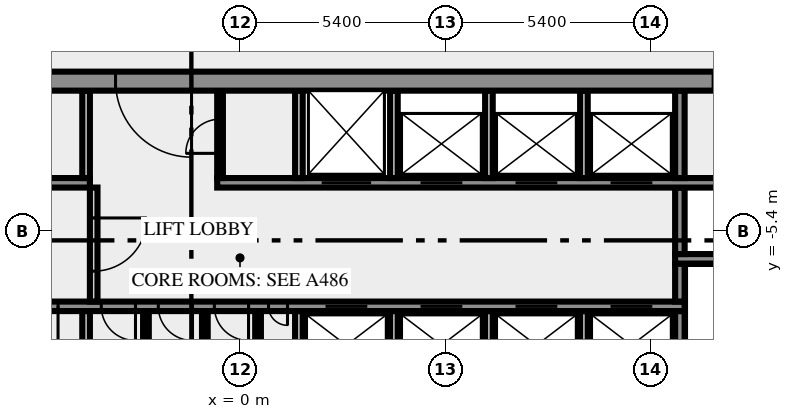
"""IFC4 building model, lengths in metres.
Left out: names, types, materials, properties, quantities, classifications, styles, units other than length and angle.
Written with IfcOpenShell. Run it as: python <this file> out.ifc"""

import sys

from ifc_helpers import new_model, si_unit, direction, frame, frame_2d, origin, place, context, subcontext, project, spatial, rectangle, extrude, element, fill, save


model = new_model("IFC4")
c1 = context("Model", 3, precision=1e-05, world=origin(), true_north=direction((0.0, 1.0)))
c2 = subcontext(c1, "Body", "Model", "MODEL_VIEW")
j1 = project(units=[si_unit("LENGTHUNIT", "METRE"), si_unit("PLANEANGLEUNIT", "RADIAN")], contexts=[c1])
p1 = place(None, origin())
s1 = spatial("IfcSite", under=j1, at=p1, CompositionType="ELEMENT")
p2 = place(p1, origin())
s2 = spatial("IfcBuilding", under=s1, at=p2, CompositionType="ELEMENT")
p3 = place(p2, frame((0.0, 0.0, 176.0)))
s3 = spatial("IfcBuildingStorey", under=s2, at=p3, CompositionType="ELEMENT", Elevation=176.0)
p4 = place(p3, frame((-4.05, -10.5, 0.0), z_axis=(0.0, 0.0, 1.0), x_axis=(0.0, 1.0, 0.0)))
e1 = element("IfcWall", 1, at=p4, inside=s3, PredefinedType="SOLIDWALL", context=c2, shape_type="SweptSolid", body=[
    extrude(rectangle(XDim=3.0, YDim=0.2, at=frame_2d((1.5, 0.0))), origin(), (0.0, 0.0, 1.0), 3.65),
])
for number, where, z_axis, x_axis in (
    (2, (-2.475, -10.5, 0.0), (0.0, 0.0, 1.0), (0.0, 1.0, 0.0)),
    (3, (-0.925, -10.5, 0.0), (0.0, 0.0, 1.0), (0.0, 1.0, 0.0)),
    (4, (0.475, -10.5, 0.0), (0.0, 0.0, 1.0), (0.0, 1.0, 0.0)),
):
    element("IfcWall", number, at=place(p3, frame(where, z_axis=z_axis, x_axis=x_axis)), inside=s3, PredefinedType="PARTITIONING", context=c2, shape_type="SweptSolid", body=[
        extrude(rectangle(XDim=3.0, YDim=0.15, at=frame_2d((1.5, 0.0))), origin(), (0.0, 0.0, 1.0), 3.65),
    ])
for number, where, z_axis, x_axis in (
    (5, (1.55, -10.5, 0.0), (0.0, 0.0, 1.0), (0.0, 1.0, 0.0)),
    (6, (4.05, -10.5, 0.0), (0.0, 0.0, 1.0), (0.0, 1.0, 0.0)),
    (7, (6.55, -10.5, 0.0), (0.0, 0.0, 1.0), (0.0, 1.0, 0.0)),
    (8, (9.05, -10.5, 0.0), (0.0, 0.0, 1.0), (0.0, 1.0, 0.0)),
):
    element("IfcWall", number, at=place(p3, frame(where, z_axis=z_axis, x_axis=x_axis)), inside=s3, PredefinedType="SOLIDWALL", context=c2, shape_type="SweptSolid", body=[
        extrude(rectangle(XDim=3.0, YDim=0.2, at=frame_2d((1.5, 0.0))), origin(), (0.0, 0.0, 1.0), 3.65),
    ])
p5 = place(p3, frame((11.575, -10.5, 0.0), z_axis=(0.0, 0.0, 1.0), x_axis=(0.0, 1.0, 0.0)))
e9 = element("IfcWall", 9, at=p5, inside=s3, PredefinedType="SHEAR", context=c2, shape_type="SweptSolid", body=[
    extrude(rectangle(XDim=3.0, YDim=0.25, at=frame_2d((1.5, 0.0))), origin(), (0.0, 0.0, 1.0), 3.65),
])
p6 = place(p3, frame((11.7, -7.375, 0.0), z_axis=(0.0, 0.0, 1.0), x_axis=(-1.0, 0.0, 0.0)))
e10 = element("IfcWall", 10, at=p6, inside=s3, PredefinedType="SHEAR", context=c2, shape_type="SweptSolid", body=[
    extrude(rectangle(XDim=23.4, YDim=0.25, at=frame_2d((11.7, 0.0))), origin(), (0.0, 0.0, 1.0), 3.65),
])
p7 = place(p6, frame((20.213, 0.0, 0.0)))
e11 = element("IfcOpeningElement", 11, at=p7, cuts=e10, PredefinedType="OPENING", context=c2, shape_type="SweptSolid", body=[
    extrude(rectangle(XDim=0.9, YDim=2.1, at=frame_2d((0.45, 1.05))), frame((0.0, 0.135, 0.0), z_axis=(0.0, -1.0, 0.0), x_axis=(1.0, 0.0, 0.0)), (0.0, 0.0, 1.0), 0.27),
])
p8 = place(p6, frame((16.488, 0.0, 0.0)))
e12 = element("IfcOpeningElement", 12, at=p8, cuts=e10, PredefinedType="OPENING", context=c2, shape_type="SweptSolid", body=[
    extrude(rectangle(XDim=0.9, YDim=2.1, at=frame_2d((0.45, 1.05))), frame((0.0, 0.135, 0.0), z_axis=(0.0, -1.0, 0.0), x_axis=(1.0, 0.0, 0.0)), (0.0, 0.0, 1.0), 0.27),
])
p9 = place(p6, frame((14.45, 0.0, 0.0)))
e13 = element("IfcOpeningElement", 13, at=p9, cuts=e10, PredefinedType="OPENING", context=c2, shape_type="SweptSolid", body=[
    extrude(rectangle(XDim=0.9, YDim=2.1, at=frame_2d((0.45, 1.05))), frame((0.0, 0.135, 0.0), z_axis=(0.0, -1.0, 0.0), x_axis=(1.0, 0.0, 0.0)), (0.0, 0.0, 1.0), 0.27),
])
p10 = place(p6, frame((12.95, 0.0, 0.0)))
e14 = element("IfcOpeningElement", 14, at=p10, cuts=e10, PredefinedType="OPENING", context=c2, shape_type="SweptSolid", body=[
    extrude(rectangle(XDim=0.9, YDim=2.1, at=frame_2d((0.45, 1.05))), frame((0.0, 0.135, 0.0), z_axis=(0.0, -1.0, 0.0), x_axis=(1.0, 0.0, 0.0)), (0.0, 0.0, 1.0), 0.27),
])
p11 = place(p6, frame((11.475, 0.0, 0.0)))
e15 = element("IfcOpeningElement", 15, at=p11, cuts=e10, PredefinedType="OPENING", context=c2, shape_type="SweptSolid", body=[
    extrude(rectangle(XDim=0.9, YDim=2.1, at=frame_2d((0.45, 1.05))), frame((0.0, 0.135, 0.0), z_axis=(0.0, -1.0, 0.0), x_axis=(1.0, 0.0, 0.0)), (0.0, 0.0, 1.0), 0.27),
])
p12 = place(p6, frame((10.45, 0.0, 0.0)))
e16 = element("IfcOpeningElement", 16, at=p12, cuts=e10, PredefinedType="OPENING", context=c2, shape_type="SweptSolid", body=[
    extrude(rectangle(XDim=0.5, YDim=2.1, at=frame_2d((0.25, 1.05))), frame((0.0, 0.135, 0.0), z_axis=(0.0, -1.0, 0.0), x_axis=(1.0, 0.0, 0.0)), (0.0, 0.0, 1.0), 0.27),
])
p13 = place(p6, frame((8.35, 0.0, 0.0)))
e17 = element("IfcOpeningElement", 17, at=p13, cuts=e10, PredefinedType="OPENING", context=c2, shape_type="SweptSolid", body=[
    extrude(rectangle(XDim=1.1, YDim=2.1, at=frame_2d((0.55, 1.05))), frame((0.0, 0.135, 0.0), z_axis=(0.0, -1.0, 0.0), x_axis=(1.0, 0.0, 0.0)), (0.0, 0.0, 1.0), 0.27),
])
p14 = place(p6, frame((5.85, 0.0, 0.0)))
e18 = element("IfcOpeningElement", 18, at=p14, cuts=e10, PredefinedType="OPENING", context=c2, shape_type="SweptSolid", body=[
    extrude(rectangle(XDim=1.1, YDim=2.1, at=frame_2d((0.55, 1.05))), frame((0.0, 0.135, 0.0), z_axis=(0.0, -1.0, 0.0), x_axis=(1.0, 0.0, 0.0)), (0.0, 0.0, 1.0), 0.27),
])
p15 = place(p6, frame((3.35, 0.0, 0.0)))
e19 = element("IfcOpeningElement", 19, at=p15, cuts=e10, PredefinedType="OPENING", context=c2, shape_type="SweptSolid", body=[
    extrude(rectangle(XDim=1.1, YDim=2.1, at=frame_2d((0.55, 1.05))), frame((0.0, 0.135, 0.0), z_axis=(0.0, -1.0, 0.0), x_axis=(1.0, 0.0, 0.0)), (0.0, 0.0, 1.0), 0.27),
])
p16 = place(p6, frame((0.85, 0.0, 0.0)))
e20 = element("IfcOpeningElement", 20, at=p16, cuts=e10, PredefinedType="OPENING", context=c2, shape_type="SweptSolid", body=[
    extrude(rectangle(XDim=1.1, YDim=2.1, at=frame_2d((0.55, 1.05))), frame((0.0, 0.135, 0.0), z_axis=(0.0, -1.0, 0.0), x_axis=(1.0, 0.0, 0.0)), (0.0, 0.0, 1.0), 0.27),
])
p17 = place(p3, frame((-3.85, -4.25, 0.0), z_axis=(0.0, 0.0, 1.0), x_axis=(0.0, -1.0, 0.0)))
e21 = element("IfcWall", 21, at=p17, inside=s3, PredefinedType="SOLIDWALL", context=c2, shape_type="SweptSolid", body=[
    extrude(rectangle(XDim=3.0, YDim=0.2, at=frame_2d((1.5, 0.0))), origin(), (0.0, 0.0, 1.0), 3.65),
])
p18 = place(p17, frame((0.8, 0.0, 0.0)))
e22 = element("IfcOpeningElement", 22, at=p18, cuts=e21, PredefinedType="OPENING", context=c2, shape_type="SweptSolid", body=[
    extrude(rectangle(XDim=1.4, YDim=2.1, at=frame_2d((0.7, 1.05))), frame((0.0, 0.11, 0.0), z_axis=(0.0, -1.0, 0.0), x_axis=(1.0, 0.0, 0.0)), (0.0, 0.0, 1.0), 0.22),
])
p19 = place(p3, frame((11.575, -7.25, 0.0), z_axis=(0.0, 0.0, 1.0), x_axis=(0.0, 1.0, 0.0)))
e23 = element("IfcWall", 23, at=p19, inside=s3, PredefinedType="SHEAR", context=c2, shape_type="SweptSolid", body=[
    extrude(rectangle(XDim=1.0, YDim=0.25, at=frame_2d((0.5, 0.0))), origin(), (0.0, 0.0, 1.0), 3.65),
])
p20 = place(p3, frame((19.5, -6.125, 0.0), z_axis=(0.0, 0.0, 1.0), x_axis=(-1.0, 0.0, 0.0)))
e24 = element("IfcWall", 24, at=p20, inside=s3, PredefinedType="SHEAR", context=c2, shape_type="SweptSolid", body=[
    extrude(rectangle(XDim=8.05, YDim=0.25, at=frame_2d((4.025, 0.0))), origin(), (0.0, 0.0, 1.0), 3.65),
])
p21 = place(p20, frame((0.05, 0.0, 0.0)))
e25 = element("IfcOpeningElement", 25, at=p21, cuts=e24, PredefinedType="OPENING", context=c2, shape_type="SweptSolid", body=[
    extrude(rectangle(XDim=1.8, YDim=2.1, at=frame_2d((0.9, 1.05))), frame((0.0, 0.135, 0.0), z_axis=(0.0, -1.0, 0.0), x_axis=(1.0, 0.0, 0.0)), (0.0, 0.0, 1.0), 0.27),
])
p22 = place(p3, frame((11.575, -6.0, 0.0), z_axis=(0.0, 0.0, 1.0), x_axis=(0.0, 1.0, 0.0)))
e26 = element("IfcWall", 26, at=p22, inside=s3, PredefinedType="SHEAR", context=c2, shape_type="SweptSolid", body=[
    extrude(rectangle(XDim=1.75, YDim=0.25, at=frame_2d((0.875, 0.0))), origin(), (0.0, 0.0, 1.0), 3.65),
])
p23 = place(p3, frame((-14.35, -4.125, 0.0), z_axis=(0.0, 0.0, 1.0), x_axis=(1.0, 0.0, 0.0)))
e27 = element("IfcWall", 27, at=p23, inside=s3, PredefinedType="SHEAR", context=c2, shape_type="SweptSolid", body=[
    extrude(rectangle(XDim=10.4, YDim=0.25, at=frame_2d((5.2, 0.0))), origin(), (0.0, 0.0, 1.0), 3.65),
])
p24 = place(p3, frame((-0.6, -4.125, 0.0), z_axis=(0.0, 0.0, 1.0), x_axis=(1.0, 0.0, 0.0)))
e28 = element("IfcWall", 28, at=p24, inside=s3, PredefinedType="SHEAR", context=c2, shape_type="SweptSolid", body=[
    extrude(rectangle(XDim=14.95, YDim=0.25, at=frame_2d((7.475, 0.0))), origin(), (0.0, 0.0, 1.0), 3.65),
])
p25 = place(p24, frame((2.75, 0.0, 0.0)))
e29 = element("IfcOpeningElement", 29, at=p25, cuts=e28, PredefinedType="OPENING", context=c2, shape_type="SweptSolid", body=[
    extrude(rectangle(XDim=1.3, YDim=2.1, at=frame_2d((0.65, 1.05))), frame((0.0, 0.135, 0.0), z_axis=(0.0, -1.0, 0.0), x_axis=(1.0, 0.0, 0.0)), (0.0, 0.0, 1.0), 0.27),
])
p26 = place(p24, frame((5.35, 0.0, 0.0)))
e30 = element("IfcOpeningElement", 30, at=p26, cuts=e28, PredefinedType="OPENING", context=c2, shape_type="SweptSolid", body=[
    extrude(rectangle(XDim=1.1, YDim=2.1, at=frame_2d((0.55, 1.05))), frame((0.0, 0.135, 0.0), z_axis=(0.0, -1.0, 0.0), x_axis=(1.0, 0.0, 0.0)), (0.0, 0.0, 1.0), 0.27),
])
p27 = place(p24, frame((7.85, 0.0, 0.0)))
e31 = element("IfcOpeningElement", 31, at=p27, cuts=e28, PredefinedType="OPENING", context=c2, shape_type="SweptSolid", body=[
    extrude(rectangle(XDim=1.1, YDim=2.1, at=frame_2d((0.55, 1.05))), frame((0.0, 0.135, 0.0), z_axis=(0.0, -1.0, 0.0), x_axis=(1.0, 0.0, 0.0)), (0.0, 0.0, 1.0), 0.27),
])
p28 = place(p24, frame((10.35, 0.0, 0.0)))
e32 = element("IfcOpeningElement", 32, at=p28, cuts=e28, PredefinedType="OPENING", context=c2, shape_type="SweptSolid", body=[
    extrude(rectangle(XDim=1.1, YDim=2.1, at=frame_2d((0.55, 1.05))), frame((0.0, 0.135, 0.0), z_axis=(0.0, -1.0, 0.0), x_axis=(1.0, 0.0, 0.0)), (0.0, 0.0, 1.0), 0.27),
])
p29 = place(p3, frame((-4.05, -4.0, 0.0), z_axis=(0.0, 0.0, 1.0), x_axis=(0.0, 1.0, 0.0)))
e33 = element("IfcWall", 33, at=p29, inside=s3, PredefinedType="SOLIDWALL", context=c2, shape_type="SweptSolid", body=[
    extrude(rectangle(XDim=2.3, YDim=0.2, at=frame_2d((1.15, 0.0))), origin(), (0.0, 0.0, 1.0), 3.65),
])
p30 = place(p3, frame((-0.525, -4.0, 0.0), z_axis=(0.0, 0.0, 1.0), x_axis=(0.0, 1.0, 0.0)))
e34 = element("IfcWall", 34, at=p30, inside=s3, PredefinedType="PARTITIONING", context=c2, shape_type="SweptSolid", body=[
    extrude(rectangle(XDim=2.3, YDim=0.15, at=frame_2d((1.15, 0.0))), origin(), (0.0, 0.0, 1.0), 3.65),
])
p31 = place(p30, frame((0.65, 0.0, 0.0)))
e35 = element("IfcOpeningElement", 35, at=p31, cuts=e34, PredefinedType="OPENING", context=c2, shape_type="SweptSolid", body=[
    extrude(rectangle(XDim=0.9, YDim=2.1, at=frame_2d((0.45, 1.05))), frame((0.0, 0.085, 0.0), z_axis=(0.0, -1.0, 0.0), x_axis=(1.0, 0.0, 0.0)), (0.0, 0.0, 1.0), 0.17),
])
for number, where, z_axis, x_axis in (
    (36, (1.55, -4.0, 0.0), (0.0, 0.0, 1.0), (0.0, 1.0, 0.0)),
    (37, (4.05, -4.0, 0.0), (0.0, 0.0, 1.0), (0.0, 1.0, 0.0)),
    (38, (6.55, -4.0, 0.0), (0.0, 0.0, 1.0), (0.0, 1.0, 0.0)),
    (39, (9.05, -4.0, 0.0), (0.0, 0.0, 1.0), (0.0, 1.0, 0.0)),
):
    element("IfcWall", number, at=place(p3, frame(where, z_axis=z_axis, x_axis=x_axis)), inside=s3, PredefinedType="SOLIDWALL", context=c2, shape_type="SweptSolid", body=[
        extrude(rectangle(XDim=2.3, YDim=0.2, at=frame_2d((1.15, 0.0))), origin(), (0.0, 0.0, 1.0), 3.65),
    ])
p32 = place(p3, frame((11.575, -4.0, 0.0), z_axis=(0.0, 0.0, 1.0), x_axis=(0.0, 1.0, 0.0)))
e40 = element("IfcWall", 40, at=p32, inside=s3, PredefinedType="SHEAR", context=c2, shape_type="SweptSolid", body=[
    extrude(rectangle(XDim=2.3, YDim=0.25, at=frame_2d((1.15, 0.0))), origin(), (0.0, 0.0, 1.0), 3.65),
])
p33 = place(p3, frame((20.49, -1.45, 0.0), z_axis=(0.0, 0.0, 1.0), x_axis=(-1.0, 0.0, 0.0)))
e41 = element("IfcWall", 41, at=p33, inside=s3, PredefinedType="SHEAR", context=c2, shape_type="SweptSolid", body=[
    extrude(rectangle(XDim=40.98, YDim=0.5, at=frame_2d((20.49, 0.0))), origin(), (0.0, 0.0, 1.0), 3.65),
])
p34 = place(p33, frame((38.14, 0.0, 0.0)))
e42 = element("IfcOpeningElement", 42, at=p34, cuts=e41, PredefinedType="OPENING", context=c2, shape_type="SweptSolid", body=[
    extrude(rectangle(XDim=1.8, YDim=2.1, at=frame_2d((0.9, 1.05))), frame((0.0, 0.26, 0.0), z_axis=(0.0, -1.0, 0.0), x_axis=(1.0, 0.0, 0.0)), (0.0, 0.0, 1.0), 0.52),
])
p35 = place(p33, frame((36.728, 0.0, 0.0)))
e43 = element("IfcOpeningElement", 43, at=p35, cuts=e41, PredefinedType="OPENING", context=c2, shape_type="SweptSolid", body=[
    extrude(rectangle(XDim=0.8, YDim=2.1, at=frame_2d((0.4, 1.05))), frame((0.0, 0.26, 0.0), z_axis=(0.0, -1.0, 0.0), x_axis=(1.0, 0.0, 0.0)), (0.0, 0.0, 1.0), 0.52),
])
p36 = place(p33, frame((35.153, 0.0, 0.0)))
e44 = element("IfcOpeningElement", 44, at=p36, cuts=e41, PredefinedType="OPENING", context=c2, shape_type="SweptSolid", body=[
    extrude(rectangle(XDim=0.8, YDim=2.1, at=frame_2d((0.4, 1.05))), frame((0.0, 0.26, 0.0), z_axis=(0.0, -1.0, 0.0), x_axis=(1.0, 0.0, 0.0)), (0.0, 0.0, 1.0), 0.52),
])
p37 = place(p33, frame((32.94, 0.0, 0.0)))
e45 = element("IfcOpeningElement", 45, at=p37, cuts=e41, PredefinedType="OPENING", context=c2, shape_type="SweptSolid", body=[
    extrude(rectangle(XDim=0.9, YDim=2.1, at=frame_2d((0.45, 1.05))), frame((0.0, 0.26, 0.0), z_axis=(0.0, -1.0, 0.0), x_axis=(1.0, 0.0, 0.0)), (0.0, 0.0, 1.0), 0.52),
])
p38 = place(p33, frame((27.84, 0.0, 0.0)))
e46 = element("IfcOpeningElement", 46, at=p38, cuts=e41, PredefinedType="OPENING", context=c2, shape_type="SweptSolid", body=[
    extrude(rectangle(XDim=0.9, YDim=2.1, at=frame_2d((0.45, 1.05))), frame((0.0, 0.26, 0.0), z_axis=(0.0, -1.0, 0.0), x_axis=(1.0, 0.0, 0.0)), (0.0, 0.0, 1.0), 0.52),
])
p39 = place(p33, frame((21.765, 0.0, 0.0)))
e47 = element("IfcOpeningElement", 47, at=p39, cuts=e41, PredefinedType="OPENING", context=c2, shape_type="SweptSolid", body=[
    extrude(rectangle(XDim=2.0, YDim=2.1, at=frame_2d((1.0, 1.05))), frame((0.0, 0.26, 0.0), z_axis=(0.0, -1.0, 0.0), x_axis=(1.0, 0.0, 0.0)), (0.0, 0.0, 1.0), 0.52),
])
p40 = place(p33, frame((7.14, 0.0, 0.0)))
e48 = element("IfcOpeningElement", 48, at=p40, cuts=e41, PredefinedType="OPENING", context=c2, shape_type="SweptSolid", body=[
    extrude(rectangle(XDim=0.9, YDim=2.1, at=frame_2d((0.45, 1.05))), frame((0.0, 0.26, 0.0), z_axis=(0.0, -1.0, 0.0), x_axis=(1.0, 0.0, 0.0)), (0.0, 0.0, 1.0), 0.52),
])
p41 = place(p33, frame((4.19, 0.0, 0.0)))
e49 = element("IfcOpeningElement", 49, at=p41, cuts=e41, PredefinedType="OPENING", context=c2, shape_type="SweptSolid", body=[
    extrude(rectangle(XDim=0.9, YDim=2.1, at=frame_2d((0.45, 1.05))), frame((0.0, 0.26, 0.0), z_axis=(0.0, -1.0, 0.0), x_axis=(1.0, 0.0, 0.0)), (0.0, 0.0, 1.0), 0.52),
])
p42 = place(p33, frame((1.04, 0.0, 0.0)))
e50 = element("IfcOpeningElement", 50, at=p42, cuts=e41, PredefinedType="OPENING", context=c2, shape_type="SweptSolid", body=[
    extrude(rectangle(XDim=1.8, YDim=2.1, at=frame_2d((0.9, 1.05))), frame((0.0, 0.26, 0.0), z_axis=(0.0, -1.0, 0.0), x_axis=(1.0, 0.0, 0.0)), (0.0, 0.0, 1.0), 0.52),
])
p43 = place(p8, origin())
e51 = element("IfcDoor", 51, at=p43, inside=s3, OperationType="SINGLE_SWING_RIGHT", PredefinedType="DOOR", context=c2, shape_type="SweptSolid", body=[
    extrude(rectangle(XDim=0.9, YDim=2.1, at=frame_2d((0.45, 1.05))), frame((0.0, 0.025, 0.0), z_axis=(0.0, -1.0, 0.0), x_axis=(1.0, 0.0, 0.0)), (0.0, 0.0, 1.0), 0.05),
])
fill(e12, e51)
p44 = place(p9, origin())
e52 = element("IfcDoor", 52, at=p44, inside=s3, OperationType="SINGLE_SWING_RIGHT", PredefinedType="DOOR", context=c2, shape_type="SweptSolid", body=[
    extrude(rectangle(XDim=0.9, YDim=2.1, at=frame_2d((0.45, 1.05))), frame((0.0, 0.025, 0.0), z_axis=(0.0, -1.0, 0.0), x_axis=(1.0, 0.0, 0.0)), (0.0, 0.0, 1.0), 0.05),
])
fill(e13, e52)
p45 = place(p10, origin())
e53 = element("IfcDoor", 53, at=p45, inside=s3, OperationType="SINGLE_SWING_RIGHT", PredefinedType="DOOR", context=c2, shape_type="SweptSolid", body=[
    extrude(rectangle(XDim=0.9, YDim=2.1, at=frame_2d((0.45, 1.05))), frame((0.0, 0.025, 0.0), z_axis=(0.0, -1.0, 0.0), x_axis=(1.0, 0.0, 0.0)), (0.0, 0.0, 1.0), 0.05),
])
fill(e14, e53)
p46 = place(p11, origin())
e54 = element("IfcDoor", 54, at=p46, inside=s3, OperationType="SINGLE_SWING_RIGHT", PredefinedType="DOOR", context=c2, shape_type="SweptSolid", body=[
    extrude(rectangle(XDim=0.9, YDim=2.1, at=frame_2d((0.45, 1.05))), frame((0.0, 0.025, 0.0), z_axis=(0.0, -1.0, 0.0), x_axis=(1.0, 0.0, 0.0)), (0.0, 0.0, 1.0), 0.05),
])
fill(e15, e54)
p47 = place(p12, origin())
e55 = element("IfcDoor", 55, at=p47, inside=s3, OperationType="SINGLE_SWING_LEFT", PredefinedType="DOOR", context=c2, shape_type="SweptSolid", body=[
    extrude(rectangle(XDim=0.5, YDim=2.1, at=frame_2d((0.25, 1.05))), frame((0.0, 0.025, 0.0), z_axis=(0.0, -1.0, 0.0), x_axis=(1.0, 0.0, 0.0)), (0.0, 0.0, 1.0), 0.05),
])
fill(e16, e55)
p48 = place(p13, origin())
e56 = element("IfcDoor", 56, at=p48, inside=s3, OperationType="DOUBLE_DOOR_SLIDING", PredefinedType="DOOR", context=c2, shape_type="SweptSolid", body=[
    extrude(rectangle(XDim=1.1, YDim=2.1, at=frame_2d((0.55, 1.05))), frame((0.0, 0.025, 0.0), z_axis=(0.0, -1.0, 0.0), x_axis=(1.0, 0.0, 0.0)), (0.0, 0.0, 1.0), 0.05),
])
fill(e17, e56)
p49 = place(p14, origin())
e57 = element("IfcDoor", 57, at=p49, inside=s3, OperationType="DOUBLE_DOOR_SLIDING", PredefinedType="DOOR", context=c2, shape_type="SweptSolid", body=[
    extrude(rectangle(XDim=1.1, YDim=2.1, at=frame_2d((0.55, 1.05))), frame((0.0, 0.025, 0.0), z_axis=(0.0, -1.0, 0.0), x_axis=(1.0, 0.0, 0.0)), (0.0, 0.0, 1.0), 0.05),
])
fill(e18, e57)
p50 = place(p15, origin())
e58 = element("IfcDoor", 58, at=p50, inside=s3, OperationType="DOUBLE_DOOR_SLIDING", PredefinedType="DOOR", context=c2, shape_type="SweptSolid", body=[
    extrude(rectangle(XDim=1.1, YDim=2.1, at=frame_2d((0.55, 1.05))), frame((0.0, 0.025, 0.0), z_axis=(0.0, -1.0, 0.0), x_axis=(1.0, 0.0, 0.0)), (0.0, 0.0, 1.0), 0.05),
])
fill(e19, e58)
p51 = place(p16, origin())
e59 = element("IfcDoor", 59, at=p51, inside=s3, OperationType="DOUBLE_DOOR_SLIDING", PredefinedType="DOOR", context=c2, shape_type="SweptSolid", body=[
    extrude(rectangle(XDim=1.1, YDim=2.1, at=frame_2d((0.55, 1.05))), frame((0.0, 0.025, 0.0), z_axis=(0.0, -1.0, 0.0), x_axis=(1.0, 0.0, 0.0)), (0.0, 0.0, 1.0), 0.05),
])
fill(e20, e59)
p52 = place(p18, origin())
e60 = element("IfcDoor", 60, at=p52, inside=s3, OperationType="DOUBLE_DOOR_SINGLE_SWING", PredefinedType="DOOR", context=c2, shape_type="SweptSolid", body=[
    extrude(rectangle(XDim=1.4, YDim=2.1, at=frame_2d((0.7, 1.05))), frame((0.0, 0.025, 0.0), z_axis=(0.0, -1.0, 0.0), x_axis=(1.0, 0.0, 0.0)), (0.0, 0.0, 1.0), 0.05),
])
fill(e22, e60)
p53 = place(p25, origin())
e61 = element("IfcDoor", 61, at=p53, inside=s3, OperationType="DOUBLE_DOOR_SLIDING", PredefinedType="DOOR", context=c2, shape_type="SweptSolid", body=[
    extrude(rectangle(XDim=1.3, YDim=2.1, at=frame_2d((0.65, 1.05))), frame((0.0, 0.025, 0.0), z_axis=(0.0, -1.0, 0.0), x_axis=(1.0, 0.0, 0.0)), (0.0, 0.0, 1.0), 0.05),
])
fill(e29, e61)
p54 = place(p26, origin())
e62 = element("IfcDoor", 62, at=p54, inside=s3, OperationType="DOUBLE_DOOR_SLIDING", PredefinedType="DOOR", context=c2, shape_type="SweptSolid", body=[
    extrude(rectangle(XDim=1.1, YDim=2.1, at=frame_2d((0.55, 1.05))), frame((0.0, 0.025, 0.0), z_axis=(0.0, -1.0, 0.0), x_axis=(1.0, 0.0, 0.0)), (0.0, 0.0, 1.0), 0.05),
])
fill(e30, e62)
p55 = place(p27, origin())
e63 = element("IfcDoor", 63, at=p55, inside=s3, OperationType="DOUBLE_DOOR_SLIDING", PredefinedType="DOOR", context=c2, shape_type="SweptSolid", body=[
    extrude(rectangle(XDim=1.1, YDim=2.1, at=frame_2d((0.55, 1.05))), frame((0.0, 0.025, 0.0), z_axis=(0.0, -1.0, 0.0), x_axis=(1.0, 0.0, 0.0)), (0.0, 0.0, 1.0), 0.05),
])
fill(e31, e63)
p56 = place(p28, origin())
e64 = element("IfcDoor", 64, at=p56, inside=s3, OperationType="DOUBLE_DOOR_SLIDING", PredefinedType="DOOR", context=c2, shape_type="SweptSolid", body=[
    extrude(rectangle(XDim=1.1, YDim=2.1, at=frame_2d((0.55, 1.05))), frame((0.0, 0.025, 0.0), z_axis=(0.0, -1.0, 0.0), x_axis=(1.0, 0.0, 0.0)), (0.0, 0.0, 1.0), 0.05),
])
fill(e32, e64)
p57 = place(p31, origin())
e65 = element("IfcDoor", 65, at=p57, inside=s3, OperationType="SINGLE_SWING_LEFT", PredefinedType="DOOR", context=c2, shape_type="SweptSolid", body=[
    extrude(rectangle(XDim=0.9, YDim=2.1, at=frame_2d((0.45, 1.05))), frame((0.0, 0.025, 0.0), z_axis=(0.0, -1.0, 0.0), x_axis=(1.0, 0.0, 0.0)), (0.0, 0.0, 1.0), 0.05),
])
fill(e35, e65)
p58 = place(p39, origin())
e66 = element("IfcDoor", 66, at=p58, inside=s3, OperationType="DOUBLE_DOOR_SINGLE_SWING", PredefinedType="DOOR", context=c2, shape_type="SweptSolid", body=[
    extrude(rectangle(XDim=2.0, YDim=2.1, at=frame_2d((1.0, 1.05))), frame((0.0, 0.025, 0.0), z_axis=(0.0, -1.0, 0.0), x_axis=(1.0, 0.0, 0.0)), (0.0, 0.0, 1.0), 0.05),
])
fill(e47, e66)
save(model, sys.argv[1])
